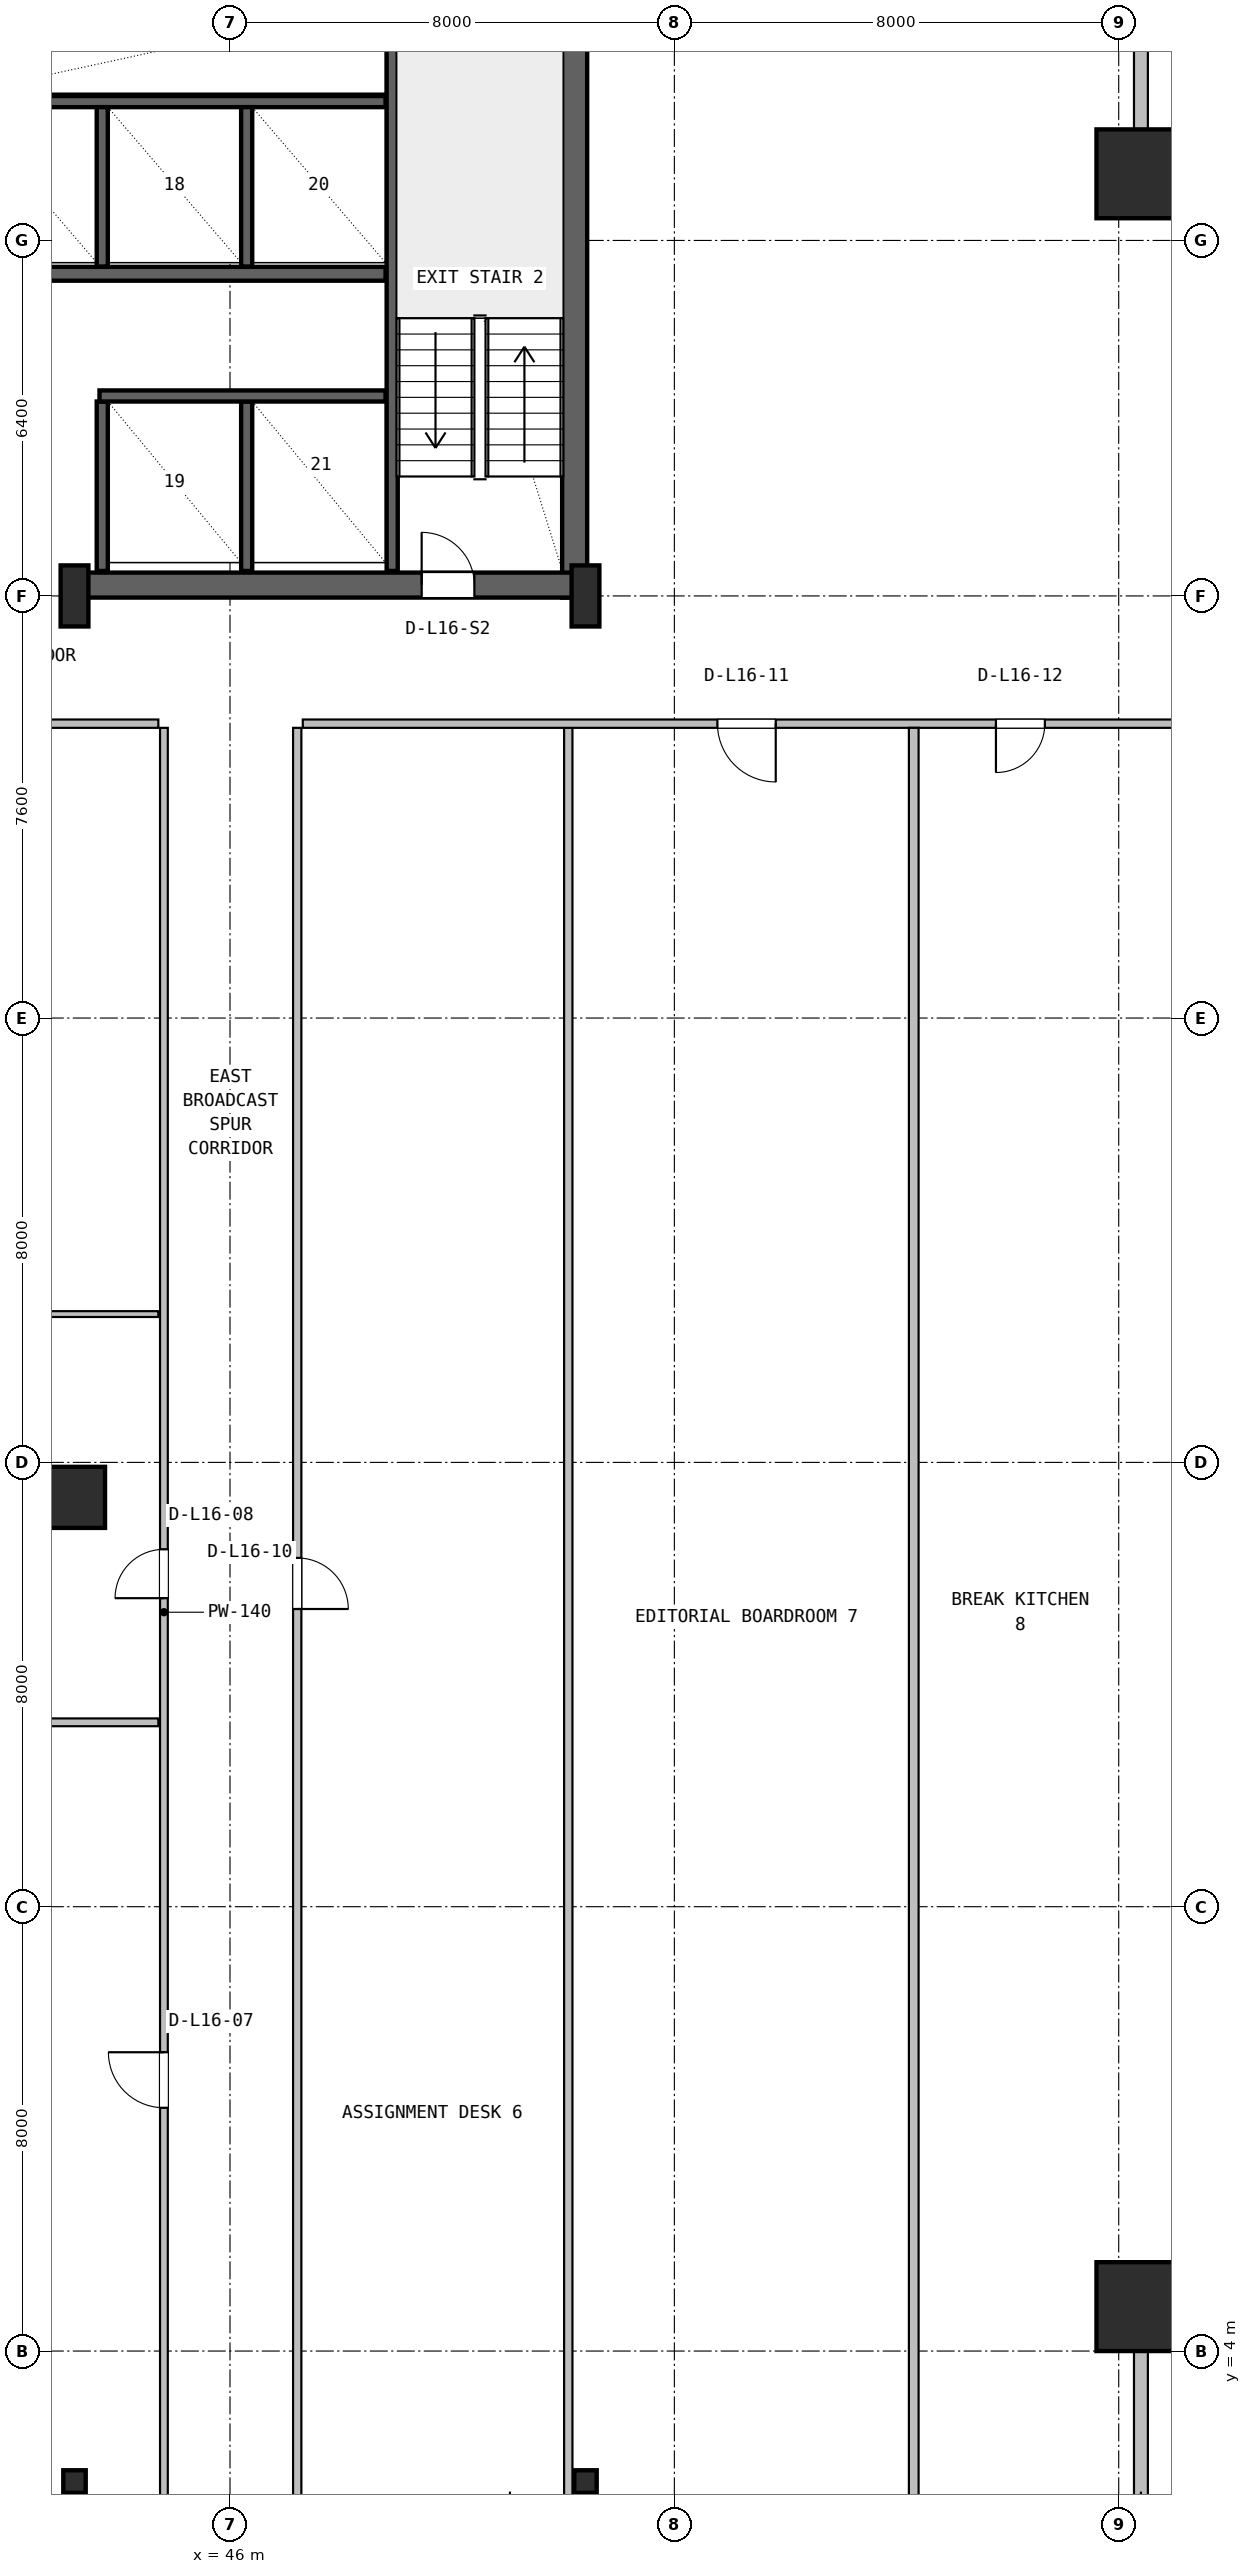
"""IFC4 building model, lengths in metres.
Left out: names, types, materials, properties, quantities, classifications, styles, units other than length and angle.
Written with IfcOpenShell. Run it as: python <this file> out.ifc"""

import sys

from ifc_helpers import new_model, si_unit, direction, frame, frame_2d, origin, origin_2d, place, context, subcontext, project, spatial, rectangle, hollow_rectangle, i_section, extrude, source, transform, mapped, element, fill, save


model = new_model("IFC4")
c1 = context("Model", 3, precision=1e-05, world=origin(), true_north=direction((0.0, 1.0)))
c2 = subcontext(c1, "Body", "Model", "MODEL_VIEW")
j1 = project(units=[si_unit("LENGTHUNIT", "METRE"), si_unit("PLANEANGLEUNIT", "RADIAN")], contexts=[c1])
p1 = place(None, origin())
s1 = spatial("IfcSite", under=j1, at=p1, CompositionType="ELEMENT")
p2 = place(p1, origin())
s2 = spatial("IfcBuilding", under=s1, at=p2, CompositionType="ELEMENT")
p3 = place(p2, frame((0.0, 0.0, 70.5)))
s3 = spatial("IfcBuildingStorey", under=s2, at=p3, CompositionType="ELEMENT", Elevation=70.5)
p4 = place(p3, frame((52.205, 35.57, 0.0), z_axis=(0.0, 0.0, 1.0), x_axis=(0.0, 1.0, 0.0)))
e1 = element("IfcWall", 1, at=p4, inside=s3, PredefinedType="SHEAR", context=c2, shape_type="SweptSolid", body=[
    extrude(rectangle(XDim=11.23, YDim=0.45, at=frame_2d((5.615, 0.0))), origin(), (0.0, 0.0, 1.0), 3.65),
])
p5 = place(p3, frame((43.2, 35.795, 0.0), z_axis=(0.0, 0.0, 1.0), x_axis=(1.0, 0.0, 0.0)))
e2 = element("IfcWall", 2, at=p5, inside=s3, PredefinedType="SHEAR", context=c2, shape_type="SweptSolid", body=[
    extrude(rectangle(XDim=9.23, YDim=0.45, at=frame_2d((4.615, 0.0))), origin(), (0.0, 0.0, 1.0), 3.65),
])
p6 = place(p5, frame((6.25, 0.0, 0.0)))
e3 = element("IfcOpeningElement", 3, at=p6, cuts=e2, PredefinedType="OPENING", context=c2, shape_type="SweptSolid", body=[
    extrude(rectangle(XDim=0.95, YDim=2.1, at=frame_2d((0.475, 1.05))), frame((0.0, 0.235, 0.0), z_axis=(0.0, -1.0, 0.0), x_axis=(1.0, 0.0, 0.0)), (0.0, 0.0, 1.0), 0.47),
])
m1 = source(origin(), c2, "Body", "SweptSolid", [
    extrude(i_section(OverallWidth=0.5, OverallDepth=1.1, WebThickness=0.018, FlangeThickness=0.032, FilletRadius=0.018, at=origin_2d()), origin(), (0.0, 0.0, 1.0), 3.9),
])
for number, where, z_axis, x_axis in (
    (4, (43.2, 35.6, 0.0), (0.0, 0.0, 1.0), (1.0, 0.0, 0.0)),
    (5, (52.4, 35.6, 0.0), (0.0, 0.0, 1.0), (1.0, 0.0, 0.0)),
):
    element("IfcColumn", number, at=place(p3, frame(where, z_axis=z_axis, x_axis=x_axis)), inside=s3, PredefinedType="COLUMN", context=c2, shape_type="MappedRepresentation", body=[
        mapped(m1, transform((0.0, 0.0, 0.0), x_axis=(1.0, 0.0, 0.0), y_axis=(0.0, 1.0, 0.0), z_axis=(0.0, 0.0, 1.0), scale=1.0)),
    ])
m2 = source(origin(), c2, "Body", "SweptSolid", [
    extrude(hollow_rectangle(XDim=1.6, YDim=1.6, WallThickness=0.06, at=origin_2d()), origin(), (0.0, 0.0, 1.0), 3.9),
])
for number, where, z_axis, x_axis in (
    (6, (62.4, 4.8, 0.0), (0.0, 0.0, 1.0), (1.0, 0.0, 0.0)),
    (7, (62.4, 43.2, 0.0), (0.0, 0.0, 1.0), (1.0, 0.0, 0.0)),
):
    element("IfcColumn", number, at=place(p3, frame(where, z_axis=z_axis, x_axis=x_axis)), inside=s3, PredefinedType="COLUMN", context=c2, shape_type="MappedRepresentation", body=[
        mapped(m2, transform((0.0, 0.0, 0.0), x_axis=(1.0, 0.0, 0.0), y_axis=(0.0, 1.0, 0.0), z_axis=(0.0, 0.0, 1.0), scale=1.0)),
    ])
m3 = source(origin(), c2, "Body", "SweptSolid", [
    extrude(i_section(OverallWidth=0.404, OverallDepth=0.407, WebThickness=0.027, FlangeThickness=0.044, FilletRadius=0.018, at=origin_2d()), origin(), (0.0, 0.0, 1.0), 3.9),
])
for number, where, z_axis, x_axis in (
    (8, (43.2, 1.65, 0.0), (0.0, 0.0, 1.0), (1.0, 0.0, 0.0)),
    (9, (52.4, 1.65, 0.0), (0.0, 0.0, 1.0), (1.0, 0.0, 0.0)),
):
    element("IfcColumn", number, at=place(p3, frame(where, z_axis=z_axis, x_axis=x_axis)), inside=s3, PredefinedType="COLUMN", context=c2, shape_type="MappedRepresentation", body=[
        mapped(m3, transform((0.0, 0.0, 0.0), x_axis=(1.0, 0.0, 0.0), y_axis=(0.0, 1.0, 0.0), z_axis=(0.0, 0.0, 1.0), scale=1.0)),
    ])
m4 = source(origin(), c2, "Body", "SweptSolid", [
    extrude(rectangle(XDim=1.1, YDim=1.1, at=origin_2d()), origin(), (0.0, 0.0, 1.0), 3.9),
])
p7 = place(p3, frame((43.2, 19.37, 0.0), z_axis=(0.0, 0.0, 1.0), x_axis=(1.0, 0.0, 0.0)))
e10 = element("IfcColumn", 10, at=p7, inside=s3, PredefinedType="COLUMN", context=c2, shape_type="MappedRepresentation", body=[
    mapped(m4, transform((0.0, 0.0, 0.0), x_axis=(1.0, 0.0, 0.0), y_axis=(0.0, 1.0, 0.0), z_axis=(0.0, 0.0, 1.0), scale=1.0)),
])
p8 = place(p3, frame((62.4, 1.28, 0.0), z_axis=(0.0, 0.0, 1.0), x_axis=(0.0, 1.0, 0.0)))
e11 = element("IfcWall", 11, at=p8, inside=s3, PredefinedType="SOLIDWALL", context=c2, shape_type="SweptSolid", body=[
    extrude(rectangle(XDim=3.6, YDim=0.25, at=frame_2d((1.8, 0.0))), origin(), (0.0, 0.0, 1.0), 3.208),
])
p9 = place(p3, frame((62.53, 43.2, 0.0), z_axis=(0.0, 0.0, 1.0), x_axis=(1.0, 0.0, 0.0)))
e12 = element("IfcWall", 12, at=p9, inside=s3, PredefinedType="SOLIDWALL", context=c2, shape_type="SweptSolid", body=[
    extrude(rectangle(XDim=3.39, YDim=0.25, at=frame_2d((1.695, 0.0))), origin(), (0.0, 0.0, 1.0), 3.63),
])
p10 = place(p3, frame((62.4, 43.12, 0.0), z_axis=(0.0, 0.0, 1.0), x_axis=(0.0, 1.0, 0.0)))
e13 = element("IfcWall", 13, at=p10, inside=s3, PredefinedType="SOLIDWALL", context=c2, shape_type="SweptSolid", body=[
    extrude(rectangle(XDim=3.6, YDim=0.25, at=frame_2d((1.8, 0.0))), origin(), (0.0, 0.0, 1.0), 3.208),
])
p11 = place(p3, frame((48.92, 36.05, 0.0), z_axis=(0.0, 0.0, 1.0), x_axis=(0.0, 1.0, 0.0)))
e14 = element("IfcWall", 14, at=p11, inside=s3, PredefinedType="SHEAR", context=c2, shape_type="SweptSolid", body=[
    extrude(rectangle(XDim=10.5, YDim=0.2, at=frame_2d((5.25, 0.0))), origin(), (0.0, 0.0, 1.0), 3.65),
])
p12 = place(p3, frame((24.98, 41.4, 0.0), z_axis=(0.0, 0.0, 1.0), x_axis=(1.0, 0.0, 0.0)))
e15 = element("IfcWall", 15, at=p12, inside=s3, PredefinedType="SHEAR", context=c2, shape_type="SweptSolid", body=[
    extrude(rectangle(XDim=23.82, YDim=0.25, at=frame_2d((11.91, 0.0))), origin(), (0.0, 0.0, 1.0), 3.65),
])
p13 = place(p12, frame((0.87, 0.0, 0.0)))
e16 = element("IfcOpeningElement", 16, at=p13, cuts=e15, PredefinedType="OPENING", context=c2, shape_type="SweptSolid", body=[
    extrude(rectangle(XDim=1.1, YDim=2.18, at=frame_2d((0.55, 1.09))), frame((0.0, 0.135, 0.0), z_axis=(0.0, -1.0, 0.0), x_axis=(1.0, 0.0, 0.0)), (0.0, 0.0, 1.0), 0.27),
])
p14 = place(p12, frame((3.47, 0.0, 0.0)))
e17 = element("IfcOpeningElement", 17, at=p14, cuts=e15, PredefinedType="OPENING", context=c2, shape_type="SweptSolid", body=[
    extrude(rectangle(XDim=1.1, YDim=2.18, at=frame_2d((0.55, 1.09))), frame((0.0, 0.135, 0.0), z_axis=(0.0, -1.0, 0.0), x_axis=(1.0, 0.0, 0.0)), (0.0, 0.0, 1.0), 0.27),
])
p15 = place(p12, frame((6.07, 0.0, 0.0)))
e18 = element("IfcOpeningElement", 18, at=p15, cuts=e15, PredefinedType="OPENING", context=c2, shape_type="SweptSolid", body=[
    extrude(rectangle(XDim=1.1, YDim=2.18, at=frame_2d((0.55, 1.09))), frame((0.0, 0.135, 0.0), z_axis=(0.0, -1.0, 0.0), x_axis=(1.0, 0.0, 0.0)), (0.0, 0.0, 1.0), 0.27),
])
p16 = place(p3, frame((41.22, 44.5, 0.0), z_axis=(0.0, 0.0, 1.0), x_axis=(1.0, 0.0, 0.0)))
e19 = element("IfcWall", 19, at=p16, inside=s3, PredefinedType="SHEAR", context=c2, shape_type="SweptSolid", body=[
    extrude(rectangle(XDim=7.58, YDim=0.2, at=frame_2d((3.79, 0.0))), origin(), (0.0, 0.0, 1.0), 3.65),
])
for number, where, z_axis, x_axis in (
    (20, (43.7, 41.53, 0.0), (0.0, 0.0, 1.0), (0.0, 1.0, 0.0)),
    (21, (46.3, 41.53, 0.0), (0.0, 0.0, 1.0), (0.0, 1.0, 0.0)),
):
    element("IfcWall", number, at=place(p3, frame(where, z_axis=z_axis, x_axis=x_axis)), inside=s3, PredefinedType="SHEAR", context=c2, shape_type="SweptSolid", body=[
        extrude(rectangle(XDim=2.87, YDim=0.2, at=frame_2d((1.435, 0.0))), origin(), (0.0, 0.0, 1.0), 3.65),
    ])
for number, where, z_axis, x_axis in (
    (22, (43.7, 36.05, 0.0), (0.0, 0.0, 1.0), (0.0, 1.0, 0.0)),
    (23, (46.3, 36.05, 0.0), (0.0, 0.0, 1.0), (0.0, 1.0, 0.0)),
):
    element("IfcWall", number, at=place(p3, frame(where, z_axis=z_axis, x_axis=x_axis)), inside=s3, PredefinedType="SHEAR", context=c2, shape_type="SweptSolid", body=[
        extrude(rectangle(XDim=3.05, YDim=0.2, at=frame_2d((1.525, 0.0))), origin(), (0.0, 0.0, 1.0), 3.65),
    ])
p17 = place(p3, frame((43.65, 39.2, 0.0), z_axis=(0.0, 0.0, 1.0), x_axis=(1.0, 0.0, 0.0)))
e24 = element("IfcWall", 24, at=p17, inside=s3, PredefinedType="SHEAR", context=c2, shape_type="SweptSolid", body=[
    extrude(rectangle(XDim=5.15, YDim=0.2, at=frame_2d((2.575, 0.0))), origin(), (0.0, 0.0, 1.0), 3.65),
])
p18 = place(p3, frame((44.81, 1.38, 0.0), z_axis=(0.0, 0.0, 1.0), x_axis=(0.0, 1.0, 0.0)))
e25 = element("IfcWall", 25, at=p18, inside=s3, PredefinedType="PARTITIONING", context=c2, shape_type="SweptSolid", body=[
    extrude(rectangle(XDim=31.845, YDim=0.14, at=frame_2d((15.923, 0.0))), origin(), (0.0, 0.0, 1.0), 3.208),
])
p19 = place(p18, frame((7.0, 0.0, 0.0)))
e26 = element("IfcOpeningElement", 26, at=p19, cuts=e25, PredefinedType="OPENING", context=c2, shape_type="SweptSolid", body=[
    extrude(rectangle(XDim=1.0, YDim=2.1, at=frame_2d((0.5, 1.05))), frame((0.0, 0.08, 0.0), z_axis=(0.0, -1.0, 0.0), x_axis=(1.0, 0.0, 0.0)), (0.0, 0.0, 1.0), 0.16),
])
p20 = place(p18, frame((16.175, 0.0, 0.0)))
e27 = element("IfcOpeningElement", 27, at=p20, cuts=e25, PredefinedType="OPENING", context=c2, shape_type="SweptSolid", body=[
    extrude(rectangle(XDim=0.88, YDim=2.06, at=frame_2d((0.44, 1.03))), frame((0.0, 0.08, 0.0), z_axis=(0.0, -1.0, 0.0), x_axis=(1.0, 0.0, 0.0)), (0.0, 0.0, 1.0), 0.16),
])
p21 = place(p3, frame((20.75, 15.32, 0.0), z_axis=(0.0, 0.0, 1.0), x_axis=(1.0, 0.0, 0.0)))
e28 = element("IfcWall", 28, at=p21, inside=s3, PredefinedType="PARTITIONING", context=c2, shape_type="SweptSolid", body=[
    extrude(rectangle(XDim=23.96, YDim=0.14, at=frame_2d((11.98, 0.0))), origin(), (0.0, 0.0, 1.0), 2.852),
])
p22 = place(p3, frame((20.75, 22.67, 0.0), z_axis=(0.0, 0.0, 1.0), x_axis=(1.0, 0.0, 0.0)))
e29 = element("IfcWall", 29, at=p22, inside=s3, PredefinedType="PARTITIONING", context=c2, shape_type="SweptSolid", body=[
    extrude(rectangle(XDim=23.96, YDim=0.105, at=frame_2d((11.98, 0.0))), origin(), (0.0, 0.0, 1.0), 2.852),
])
p23 = place(p3, frame((20.75, 33.3, 0.0), z_axis=(0.0, 0.0, 1.0), x_axis=(1.0, 0.0, 0.0)))
e30 = element("IfcWall", 30, at=p23, inside=s3, PredefinedType="PARTITIONING", context=c2, shape_type="SweptSolid", body=[
    extrude(rectangle(XDim=23.96, YDim=0.15, at=frame_2d((11.98, 0.0))), origin(), (0.0, 0.0, 1.0), 2.852),
])
p24 = place(p23, frame((11.52, 0.0, 0.0)))
e31 = element("IfcOpeningElement", 31, at=p24, cuts=e30, PredefinedType="OPENING", context=c2, shape_type="SweptSolid", body=[
    extrude(rectangle(XDim=0.92, YDim=2.08, at=frame_2d((0.46, 1.04))), frame((0.0, 0.085, 0.0), z_axis=(0.0, -1.0, 0.0), x_axis=(1.0, 0.0, 0.0)), (0.0, 0.0, 1.0), 0.17),
])
p25 = place(p3, frame((52.09, 1.38, 0.0), z_axis=(0.0, 0.0, 1.0), x_axis=(0.0, 1.0, 0.0)))
e32 = element("IfcWall", 32, at=p25, inside=s3, PredefinedType="PARTITIONING", context=c2, shape_type="SweptSolid", body=[
    extrude(rectangle(XDim=31.845, YDim=0.15, at=frame_2d((15.923, 0.0))), origin(), (0.0, 0.0, 1.0), 3.208),
])
p26 = place(p3, frame((47.31, 33.3, 0.0), z_axis=(0.0, 0.0, 1.0), x_axis=(1.0, 0.0, 0.0)))
e33 = element("IfcWall", 33, at=p26, inside=s3, PredefinedType="PARTITIONING", context=c2, shape_type="SweptSolid", body=[
    extrude(rectangle(XDim=18.51, YDim=0.15, at=frame_2d((9.255, 0.0))), origin(), (0.0, 0.0, 1.0), 3.208),
])
p27 = place(p26, frame((7.465, 0.0, 0.0)))
e34 = element("IfcOpeningElement", 34, at=p27, cuts=e33, PredefinedType="OPENING", context=c2, shape_type="SweptSolid", body=[
    extrude(rectangle(XDim=1.05, YDim=2.1, at=frame_2d((0.525, 1.05))), frame((0.0, 0.085, 0.0), z_axis=(0.0, -1.0, 0.0), x_axis=(1.0, 0.0, 0.0)), (0.0, 0.0, 1.0), 0.17),
])
p28 = place(p26, frame((12.48, 0.0, 0.0)))
e35 = element("IfcOpeningElement", 35, at=p28, cuts=e33, PredefinedType="OPENING", context=c2, shape_type="SweptSolid", body=[
    extrude(rectangle(XDim=0.88, YDim=2.06, at=frame_2d((0.44, 1.03))), frame((0.0, 0.085, 0.0), z_axis=(0.0, -1.0, 0.0), x_axis=(1.0, 0.0, 0.0)), (0.0, 0.0, 1.0), 0.17),
])
p29 = place(p3, frame((47.21, 1.38, 0.0), z_axis=(0.0, 0.0, 1.0), x_axis=(0.0, 1.0, 0.0)))
e36 = element("IfcWall", 36, at=p29, inside=s3, PredefinedType="PARTITIONING", context=c2, shape_type="SweptSolid", body=[
    extrude(rectangle(XDim=31.845, YDim=0.15, at=frame_2d((15.923, 0.0))), origin(), (0.0, 0.0, 1.0), 3.208),
])
p30 = place(p29, frame((15.98, 0.0, 0.0)))
e37 = element("IfcOpeningElement", 37, at=p30, cuts=e36, PredefinedType="OPENING", context=c2, shape_type="SweptSolid", body=[
    extrude(rectangle(XDim=0.92, YDim=2.08, at=frame_2d((0.46, 1.04))), frame((0.0, 0.085, 0.0), z_axis=(0.0, -1.0, 0.0), x_axis=(1.0, 0.0, 0.0)), (0.0, 0.0, 1.0), 0.17),
])
p31 = place(p3, frame((58.31, 1.38, 0.0), z_axis=(0.0, 0.0, 1.0), x_axis=(0.0, 1.0, 0.0)))
e38 = element("IfcWall", 38, at=p31, inside=s3, PredefinedType="PARTITIONING", context=c2, shape_type="SweptSolid", body=[
    extrude(rectangle(XDim=31.845, YDim=0.175, at=frame_2d((15.923, 0.0))), origin(), (0.0, 0.0, 1.0), 3.208),
])
m5 = source(origin(), c2, "Body", "SweptSolid", [
    extrude(rectangle(XDim=0.95, YDim=2.1, at=frame_2d((0.475, 1.05))), frame((0.0, 0.025, 0.0), z_axis=(0.0, -1.0, 0.0), x_axis=(1.0, 0.0, 0.0)), (0.0, 0.0, 1.0), 0.05),
])
p32 = place(p6, origin())
e39 = element("IfcDoor", 39, at=p32, inside=s3, OperationType="SINGLE_SWING_LEFT", PredefinedType="DOOR", context=c2, shape_type="MappedRepresentation", body=[
    mapped(m5, transform((0.0, 0.0, 0.0), x_axis=(1.0, 0.0, 0.0), y_axis=(0.0, 1.0, 0.0), z_axis=(0.0, 0.0, 1.0), scale=1.0)),
])
fill(e3, e39)
m6 = source(origin(), c2, "Body", "SweptSolid", [
    extrude(rectangle(XDim=1.0, YDim=2.1, at=frame_2d((0.5, 1.05))), frame((0.0, 0.025, 0.0), z_axis=(0.0, -1.0, 0.0), x_axis=(1.0, 0.0, 0.0)), (0.0, 0.0, 1.0), 0.05),
])
p33 = place(p19, origin())
e40 = element("IfcDoor", 40, at=p33, inside=s3, OperationType="SINGLE_SWING_RIGHT", PredefinedType="DOOR", context=c2, shape_type="MappedRepresentation", body=[
    mapped(m6, transform((0.0, 0.0, 0.0), x_axis=(1.0, 0.0, 0.0), y_axis=(0.0, 1.0, 0.0), z_axis=(0.0, 0.0, 1.0), scale=1.0)),
])
fill(e26, e40)
m7 = source(origin(), c2, "Body", "SweptSolid", [
    extrude(rectangle(XDim=0.88, YDim=2.06, at=frame_2d((0.44, 1.03))), frame((0.0, 0.025, 0.0), z_axis=(0.0, -1.0, 0.0), x_axis=(1.0, 0.0, 0.0)), (0.0, 0.0, 1.0), 0.05),
])
p34 = place(p20, origin())
e41 = element("IfcDoor", 41, at=p34, inside=s3, OperationType="SINGLE_SWING_LEFT", PredefinedType="DOOR", context=c2, shape_type="MappedRepresentation", body=[
    mapped(m7, transform((0.0, 0.0, 0.0), x_axis=(1.0, 0.0, 0.0), y_axis=(0.0, 1.0, 0.0), z_axis=(0.0, 0.0, 1.0), scale=1.0)),
])
fill(e27, e41)
m8 = source(origin(), c2, "Body", "SweptSolid", [
    extrude(rectangle(XDim=0.92, YDim=2.08, at=frame_2d((0.46, 1.04))), frame((0.0, 0.025, 0.0), z_axis=(0.0, -1.0, 0.0), x_axis=(1.0, 0.0, 0.0)), (0.0, 0.0, 1.0), 0.05),
])
p35 = place(p30, frame((0.92, 0.0, 0.0), z_axis=(0.0, 0.0, 1.0), x_axis=(-1.0, 0.0, 0.0)))
e42 = element("IfcDoor", 42, at=p35, inside=s3, OperationType="SINGLE_SWING_LEFT", PredefinedType="DOOR", context=c2, shape_type="MappedRepresentation", body=[
    mapped(m8, transform((0.0, 0.0, 0.0), x_axis=(1.0, 0.0, 0.0), y_axis=(0.0, 1.0, 0.0), z_axis=(0.0, 0.0, 1.0), scale=1.0)),
])
fill(e37, e42)
m9 = source(origin(), c2, "Body", "SweptSolid", [
    extrude(rectangle(XDim=1.05, YDim=2.1, at=frame_2d((0.525, 1.05))), frame((0.0, 0.025, 0.0), z_axis=(0.0, -1.0, 0.0), x_axis=(1.0, 0.0, 0.0)), (0.0, 0.0, 1.0), 0.05),
])
p36 = place(p27, frame((1.05, 0.0, 0.0), z_axis=(0.0, 0.0, 1.0), x_axis=(-1.0, 0.0, 0.0)))
e43 = element("IfcDoor", 43, at=p36, inside=s3, OperationType="SINGLE_SWING_RIGHT", PredefinedType="DOOR", context=c2, shape_type="MappedRepresentation", body=[
    mapped(m9, transform((0.0, 0.0, 0.0), x_axis=(1.0, 0.0, 0.0), y_axis=(0.0, 1.0, 0.0), z_axis=(0.0, 0.0, 1.0), scale=1.0)),
])
fill(e34, e43)
p37 = place(p28, frame((0.88, 0.0, 0.0), z_axis=(0.0, 0.0, 1.0), x_axis=(-1.0, 0.0, 0.0)))
e44 = element("IfcDoor", 44, at=p37, inside=s3, OperationType="SINGLE_SWING_LEFT", PredefinedType="DOOR", context=c2, shape_type="MappedRepresentation", body=[
    mapped(m7, transform((0.0, 0.0, 0.0), x_axis=(1.0, 0.0, 0.0), y_axis=(0.0, 1.0, 0.0), z_axis=(0.0, 0.0, 1.0), scale=1.0)),
])
fill(e35, e44)
save(model, sys.argv[1])
